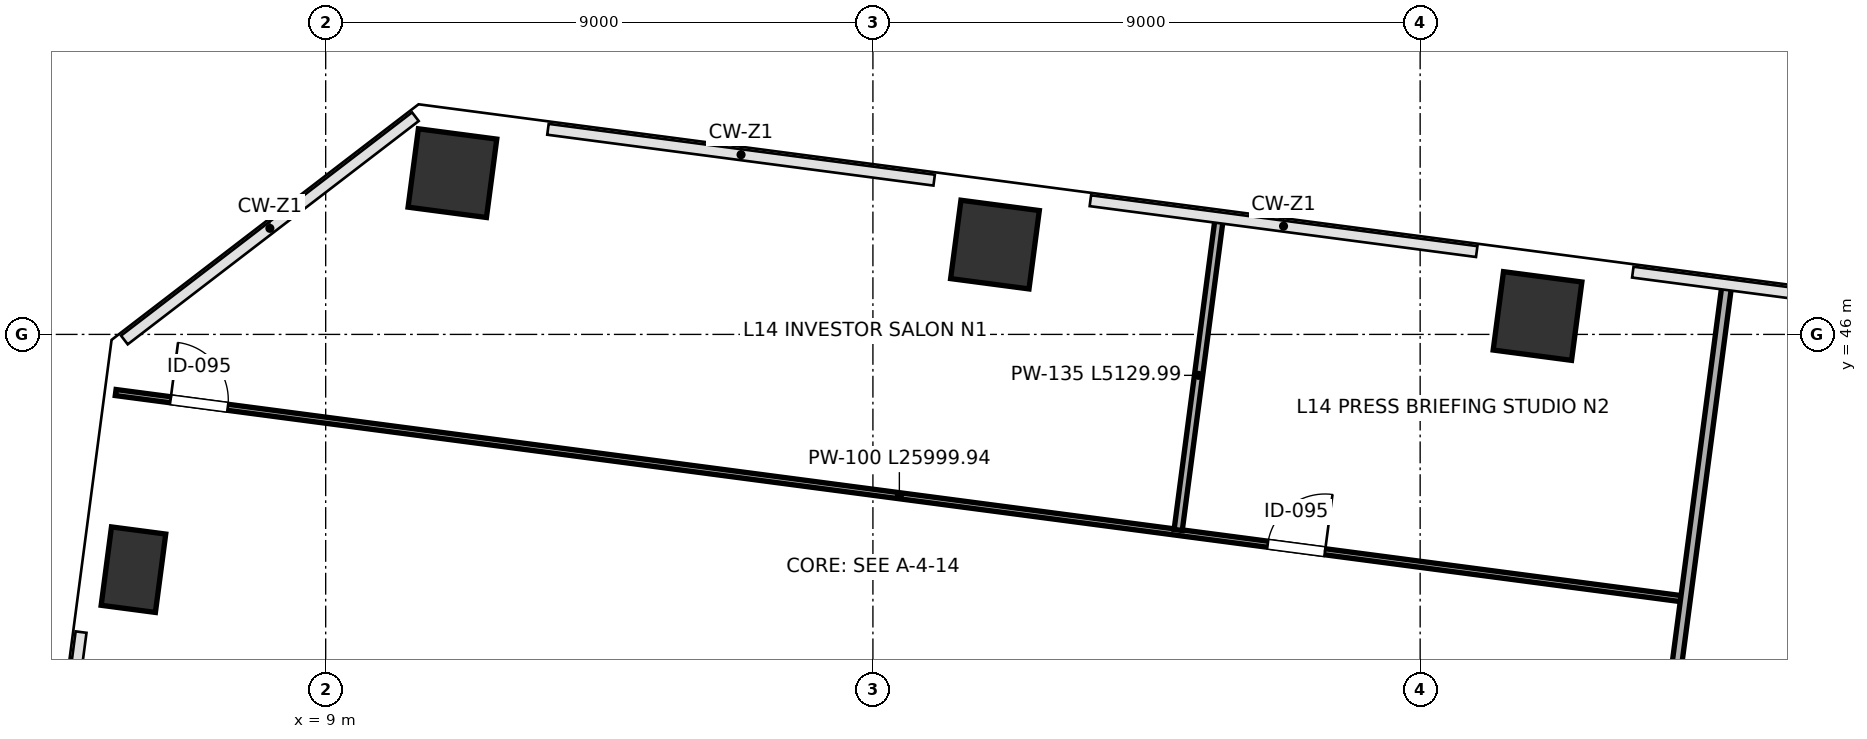
"""IFC4 building model, lengths in metres.
Left out: names, types, materials, properties, quantities, classifications, styles, units other than length and angle.
Written with IfcOpenShell. Run it as: python <this file> out.ifc"""

import sys

from ifc_helpers import new_model, si_unit, direction, frame, frame_2d, origin, origin_2d, place, context, subcontext, project, spatial, rectangle, extrude, clip, halfspace, source, transform, mapped, element, fill, save


model = new_model("IFC4")
c1 = context("Model", 3, precision=1e-05, world=origin(), true_north=direction((0.0, 1.0)))
c2 = subcontext(c1, "Body", "Model", "MODEL_VIEW")
j1 = project(units=[si_unit("LENGTHUNIT", "METRE"), si_unit("PLANEANGLEUNIT", "RADIAN")], contexts=[c1])
p1 = place(None, origin())
s1 = spatial("IfcSite", under=j1, at=p1, CompositionType="ELEMENT")
p2 = place(p1, origin())
s2 = spatial("IfcBuilding", under=s1, at=p2, CompositionType="ELEMENT")
p3 = place(p2, frame((0.0, 0.0, 66.4)))
s3 = spatial("IfcBuildingStorey", under=s2, at=p3, CompositionType="ELEMENT", Elevation=66.4)
p4 = place(p3, frame((11.084, 48.652, 0.0), z_axis=(0.086623318147, 0.052852945785, 0.994838161147), x_axis=(0.405546364063, -0.913978509128, 0.013245053707)))
e1 = element("IfcColumn", 1, at=p4, inside=s3, PredefinedType="COLUMN", context=c2, shape_type="Clipping", body=[
    clip(clip(extrude(rectangle(XDim=1.3, YDim=1.3, at=origin_2d()), origin(), (0.0, 0.0, 1.0), 4.222), halfspace(frame((0.0, 0.0, 0.075), z_axis=(0.0, 0.0, -1.0), x_axis=(1.0, 0.0, 0.0)), False)), halfspace(frame((0.0, 0.0, 4.147), z_axis=(0.0, 0.0, 1.0), x_axis=(1.0, 0.0, 0.0)), False)),
])
p5 = place(p3, frame((20.007, 47.477, 0.0), z_axis=(0.080243045619, 0.006836591612, 0.996751882188), x_axis=(-0.04546783483, -0.998910495896, 0.01051176411)))
e2 = element("IfcColumn", 2, at=p5, inside=s3, PredefinedType="COLUMN", context=c2, shape_type="Clipping", body=[
    clip(clip(extrude(rectangle(XDim=1.3, YDim=1.3, at=origin_2d()), origin(), (0.0, 0.0, 1.0), 4.214), halfspace(frame((0.0, 0.0, 0.06), z_axis=(0.0, 0.0, -1.0), x_axis=(1.0, 0.0, 0.0)), False)), halfspace(frame((0.0, 0.0, 4.154), z_axis=(0.0, 0.0, 1.0), x_axis=(1.0, 0.0, 0.0)), False)),
])
p6 = place(p3, frame((28.93, 46.302, 0.0), z_axis=(0.073620538621, -0.039272010374, 0.996512782404), x_axis=(-0.581397277632, -0.813546918552, 0.010891137473)))
e3 = element("IfcColumn", 3, at=p6, inside=s3, PredefinedType="COLUMN", context=c2, shape_type="Clipping", body=[
    clip(clip(extrude(rectangle(XDim=1.3, YDim=1.3, at=origin_2d()), origin(), (0.0, 0.0, 1.0), 4.215), halfspace(frame((0.0, 0.0, 0.062), z_axis=(0.0, 0.0, -1.0), x_axis=(1.0, 0.0, 0.0)), False)), halfspace(frame((0.0, 0.0, 4.153), z_axis=(0.0, 0.0, 1.0), x_axis=(1.0, 0.0, 0.0)), False)),
])
p7 = place(p3, frame((5.838, 42.131, 0.0), z_axis=(0.053226685756, 0.080418579566, 0.995339023642), x_axis=(0.755052231351, -0.655543804134, 0.012587644438)))
e4 = element("IfcColumn", 4, at=p7, inside=s3, PredefinedType="PILASTER", context=c2, shape_type="Clipping", body=[
    clip(clip(extrude(rectangle(XDim=0.9, YDim=1.3, at=origin_2d()), origin(), (0.0, 0.0, 1.0), 4.22), halfspace(frame((0.0, 0.0, 0.069), z_axis=(0.0, 0.0, -1.0), x_axis=(1.0, 0.0, 0.0)), False)), halfspace(frame((0.0, 0.0, 4.151), z_axis=(0.0, 0.0, 1.0), x_axis=(1.0, 0.0, 0.0)), False)),
])
p8 = place(p3, frame((5.546, 45.044, 0.0), z_axis=(0.0, 0.0, 1.0), x_axis=(0.99144534416, -0.13052252504, 0.0)))
e5 = element("IfcWall", 5, at=p8, inside=s3, PredefinedType="PARTITIONING", context=c2, shape_type="SweptSolid", body=[
    extrude(rectangle(XDim=26.0, YDim=0.1, at=frame_2d((13.0, 0.0))), origin(), (0.0, 0.0, 1.0), 3.96),
])
p9 = place(p8, frame((0.91, 0.0, 0.0)))
e6 = element("IfcOpeningElement", 6, at=p9, cuts=e5, PredefinedType="OPENING", context=c2, shape_type="SweptSolid", body=[
    extrude(rectangle(XDim=0.95, YDim=2.15, at=frame_2d((0.475, 1.075))), frame((0.0, 0.06, 0.0), z_axis=(0.0, -1.0, 0.0), x_axis=(1.0, 0.0, 0.0)), (0.0, 0.0, 1.0), 0.12),
])
p10 = place(p8, frame((19.11, 0.0, 0.0)))
e7 = element("IfcOpeningElement", 7, at=p10, cuts=e5, PredefinedType="OPENING", context=c2, shape_type="SweptSolid", body=[
    extrude(rectangle(XDim=0.95, YDim=2.15, at=frame_2d((0.475, 1.075))), frame((0.0, 0.06, 0.0), z_axis=(0.0, -1.0, 0.0), x_axis=(1.0, 0.0, 0.0)), (0.0, 0.0, 1.0), 0.12),
])
p11 = place(p3, frame((23.021, 42.784, 0.0), z_axis=(0.0, 0.0, 1.0), x_axis=(0.130539454953, 0.991443115212, 0.0)))
e8 = element("IfcWall", 8, at=p11, inside=s3, PredefinedType="PARTITIONING", context=c2, shape_type="SweptSolid", body=[
    extrude(rectangle(XDim=5.13, YDim=0.135, at=frame_2d((2.565, 0.0))), origin(), (0.0, 0.0, 1.0), 3.095),
])
p12 = place(p3, frame((29.644, 28.588, 0.0), z_axis=(0.0, 0.0, 1.0), x_axis=(0.130525105318, 0.991445004467, 0.0)))
e9 = element("IfcWall", 9, at=p12, inside=s3, PredefinedType="PARTITIONING", context=c2, shape_type="SweptSolid", body=[
    extrude(rectangle(XDim=18.34, YDim=0.16, at=frame_2d((9.17, 0.0))), origin(), (0.0, 0.0, 1.0), 3.095),
])
m1 = source(origin(), c2, "Body", "SweptSolid", [
    extrude(rectangle(XDim=0.95, YDim=2.15, at=frame_2d((0.475, 1.075))), frame((0.0, 0.025, 0.0), z_axis=(0.0, -1.0, 0.0), x_axis=(1.0, 0.0, 0.0)), (0.0, 0.0, 1.0), 0.05),
])
p13 = place(p9, origin())
e10 = element("IfcDoor", 10, at=p13, inside=s3, OperationType="SINGLE_SWING_LEFT", PredefinedType="DOOR", context=c2, shape_type="MappedRepresentation", body=[
    mapped(m1, transform((0.0, 0.0, 0.0), scale=1.0)),
])
fill(e6, e10)
p14 = place(p10, origin())
e11 = element("IfcDoor", 11, at=p14, inside=s3, OperationType="SINGLE_SWING_RIGHT", PredefinedType="DOOR", context=c2, shape_type="MappedRepresentation", body=[
    mapped(m1, transform((0.0, 0.0, 0.0), scale=1.0)),
])
fill(e7, e11)
save(model, sys.argv[1])
